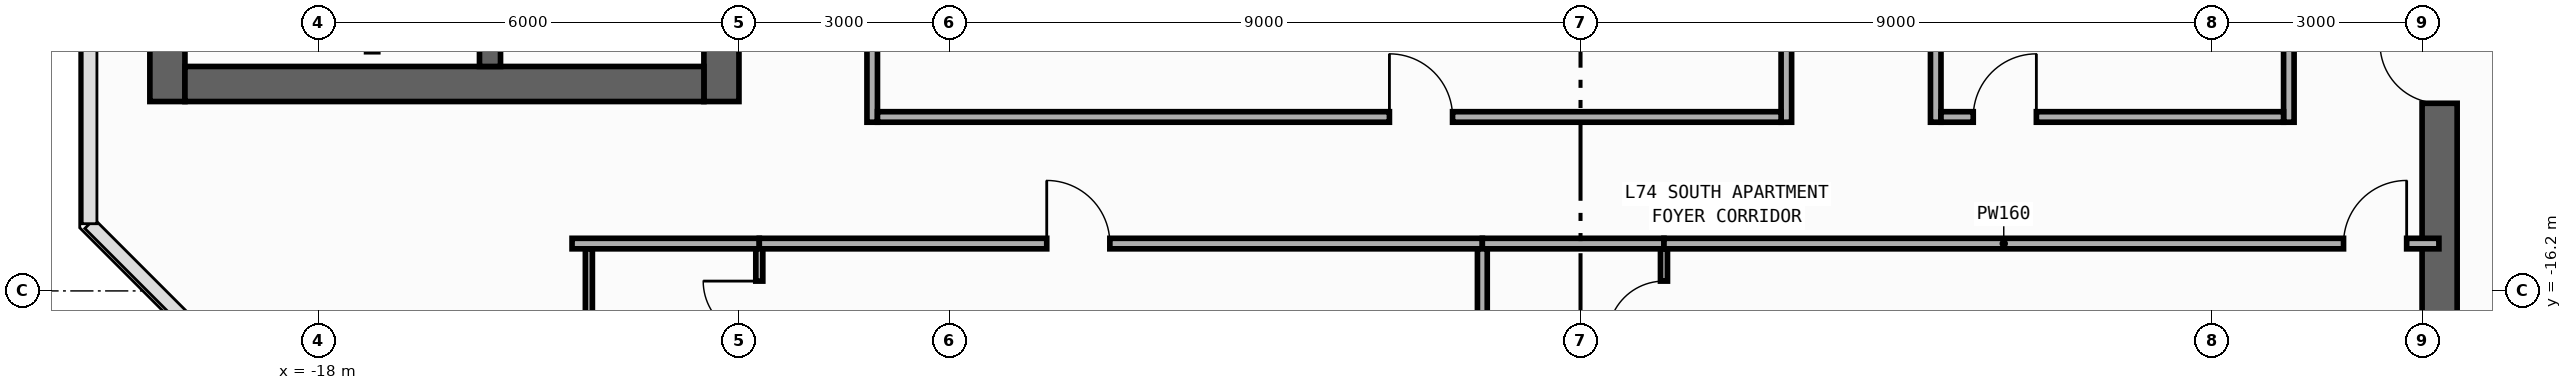
"""IFC4 building model, lengths in metres.
Left out: names, types, materials, properties, quantities, classifications, styles, units other than length and angle.
Written with IfcOpenShell. Run it as: python <this file> out.ifc"""

import sys

from ifc_helpers import new_model, si_unit, direction, frame, frame_2d, origin, place, context, subcontext, project, spatial, rectangle, extrude, element, fill, save


model = new_model("IFC4")
c1 = context("Model", 3, precision=1e-05, world=origin(), true_north=direction((0.0, 1.0)))
c2 = subcontext(c1, "Body", "Model", "MODEL_VIEW")
j1 = project(units=[si_unit("LENGTHUNIT", "METRE"), si_unit("PLANEANGLEUNIT", "RADIAN")], contexts=[c1])
p1 = place(None, origin())
s1 = spatial("IfcSite", under=j1, at=p1, CompositionType="ELEMENT")
p2 = place(p1, origin())
s2 = spatial("IfcBuilding", under=s1, at=p2, CompositionType="ELEMENT")
p3 = place(p2, frame((0.0, 0.0, 308.0)))
s3 = spatial("IfcBuildingStorey", under=s2, at=p3, CompositionType="ELEMENT", Elevation=308.0)
p4 = place(p3, frame((-20.15, -13.5, 0.0), z_axis=(0.0, 0.0, 1.0), x_axis=(0.0, 1.0, 0.0)))
e1 = element("IfcWall", 1, at=p4, inside=s3, PredefinedType="SHEAR", context=c2, shape_type="SweptSolid", body=[
    extrude(rectangle(XDim=27.0, YDim=0.5, at=frame_2d((13.5, 0.0))), origin(), (0.0, 0.0, 1.0), 3.54),
])
p5 = place(p3, frame((-12.25, -13.5, 0.0), z_axis=(0.0, 0.0, 1.0), x_axis=(0.0, 1.0, 0.0)))
e2 = element("IfcWall", 2, at=p5, inside=s3, PredefinedType="SHEAR", context=c2, shape_type="SweptSolid", body=[
    extrude(rectangle(XDim=27.0, YDim=0.5, at=frame_2d((13.5, 0.0))), origin(), (0.0, 0.0, 1.0), 3.54),
])
p6 = place(p5, frame((15.175, 0.0, 0.0)))
e3 = element("IfcOpeningElement", 3, at=p6, cuts=e2, PredefinedType="OPENING", context=c2, shape_type="SweptSolid", body=[
    extrude(rectangle(XDim=0.85, YDim=2.1, at=frame_2d((0.425, 1.05))), frame((0.0, 0.26, 0.0), z_axis=(0.0, -1.0, 0.0), x_axis=(1.0, 0.0, 0.0)), (0.0, 0.0, 1.0), 0.52),
])
p7 = place(p5, frame((21.275, 0.0, 0.0)))
e4 = element("IfcOpeningElement", 4, at=p7, cuts=e2, PredefinedType="OPENING", context=c2, shape_type="SweptSolid", body=[
    extrude(rectangle(XDim=0.85, YDim=2.1, at=frame_2d((0.425, 1.05))), frame((0.0, 0.26, 0.0), z_axis=(0.0, -1.0, 0.0), x_axis=(1.0, 0.0, 0.0)), (0.0, 0.0, 1.0), 0.52),
])
p8 = place(p5, frame((4.275, 0.0, 0.0)))
e5 = element("IfcOpeningElement", 5, at=p8, cuts=e2, PredefinedType="OPENING", context=c2, shape_type="SweptSolid", body=[
    extrude(rectangle(XDim=0.85, YDim=2.1, at=frame_2d((0.425, 1.05))), frame((0.0, 0.26, 0.0), z_axis=(0.0, -1.0, 0.0), x_axis=(1.0, 0.0, 0.0)), (0.0, 0.0, 1.0), 0.52),
])
p9 = place(p5, frame((10.275, 0.0, 0.0)))
e6 = element("IfcOpeningElement", 6, at=p9, cuts=e2, PredefinedType="OPENING", context=c2, shape_type="SweptSolid", body=[
    extrude(rectangle(XDim=0.85, YDim=2.1, at=frame_2d((0.425, 1.05))), frame((0.0, 0.26, 0.0), z_axis=(0.0, -1.0, 0.0), x_axis=(1.0, 0.0, 0.0)), (0.0, 0.0, 1.0), 0.52),
])
p10 = place(p5, frame((12.725, 0.0, 0.0)))
e7 = element("IfcOpeningElement", 7, at=p10, cuts=e2, PredefinedType="OPENING", context=c2, shape_type="SweptSolid", body=[
    extrude(rectangle(XDim=1.15, YDim=2.2, at=frame_2d((0.575, 1.1))), frame((0.0, 0.26, 0.0), z_axis=(0.0, -1.0, 0.0), x_axis=(1.0, 0.0, 0.0)), (0.0, 0.0, 1.0), 0.52),
])
p11 = place(p5, frame((1.625, 0.0, 0.0)))
e8 = element("IfcOpeningElement", 8, at=p11, cuts=e2, PredefinedType="OPENING", context=c2, shape_type="SweptSolid", body=[
    extrude(rectangle(XDim=0.85, YDim=2.1, at=frame_2d((0.425, 1.05))), frame((0.0, 0.26, 0.0), z_axis=(0.0, -1.0, 0.0), x_axis=(1.0, 0.0, 0.0)), (0.0, 0.0, 1.0), 0.52),
])
p12 = place(p3, frame((-19.9, -13.25, 0.0), z_axis=(0.0, 0.0, 1.0), x_axis=(1.0, 0.0, 0.0)))
e9 = element("IfcWall", 9, at=p12, inside=s3, PredefinedType="SHEAR", context=c2, shape_type="SweptSolid", body=[
    extrude(rectangle(XDim=7.4, YDim=0.5, at=frame_2d((3.7, 0.0))), origin(), (0.0, 0.0, 1.0), 3.54),
])
p13 = place(p3, frame((-15.55, -13.0, 0.0), z_axis=(0.0, 0.0, 1.0), x_axis=(0.0, 1.0, 0.0)))
e10 = element("IfcWall", 10, at=p13, inside=s3, PredefinedType="SHEAR", context=c2, shape_type="SweptSolid", body=[
    extrude(rectangle(XDim=26.0, YDim=0.3, at=frame_2d((13.0, 0.0))), origin(), (0.0, 0.0, 1.0), 3.54),
])
p14 = place(p13, frame((12.225, 0.0, 0.0)))
e11 = element("IfcOpeningElement", 11, at=p14, cuts=e10, PredefinedType="OPENING", context=c2, shape_type="SweptSolid", body=[
    extrude(rectangle(XDim=1.15, YDim=2.2, at=frame_2d((0.575, 1.1))), frame((0.0, 0.16, 0.0), z_axis=(0.0, -1.0, 0.0), x_axis=(1.0, 0.0, 0.0)), (0.0, 0.0, 1.0), 0.32),
])
p15 = place(p13, frame((1.125, 0.0, 0.0)))
e12 = element("IfcOpeningElement", 12, at=p15, cuts=e10, PredefinedType="OPENING", context=c2, shape_type="SweptSolid", body=[
    extrude(rectangle(XDim=0.85, YDim=2.1, at=frame_2d((0.425, 1.05))), frame((0.0, 0.16, 0.0), z_axis=(0.0, -1.0, 0.0), x_axis=(1.0, 0.0, 0.0)), (0.0, 0.0, 1.0), 0.32),
])
p16 = place(p3, frame((12.25, -19.8, 0.0), z_axis=(0.0, 0.0, 1.0), x_axis=(0.0, 1.0, 0.0)))
e13 = element("IfcWall", 13, at=p16, inside=s3, PredefinedType="SHEAR", context=c2, shape_type="SweptSolid", body=[
    extrude(rectangle(XDim=27.0, YDim=0.5, at=frame_2d((13.5, 0.0))), origin(), (0.0, 0.0, 1.0), 3.54),
])
p17 = place(p16, frame((23.05, 0.0, 0.0)))
e14 = element("IfcOpeningElement", 14, at=p17, cuts=e13, PredefinedType="OPENING", context=c2, shape_type="SweptSolid", body=[
    extrude(rectangle(XDim=1.1, YDim=2.2, at=frame_2d((0.55, 1.1))), frame((0.0, 0.26, 0.0), z_axis=(0.0, -1.0, 0.0), x_axis=(1.0, 0.0, 0.0)), (0.0, 0.0, 1.0), 0.52),
])
p18 = place(p16, frame((19.85, 0.0, 0.0)))
e15 = element("IfcOpeningElement", 15, at=p18, cuts=e13, PredefinedType="OPENING", context=c2, shape_type="SweptSolid", body=[
    extrude(rectangle(XDim=1.1, YDim=2.2, at=frame_2d((0.55, 1.1))), frame((0.0, 0.26, 0.0), z_axis=(0.0, -1.0, 0.0), x_axis=(1.0, 0.0, 0.0)), (0.0, 0.0, 1.0), 0.52),
])
p19 = place(p16, frame((16.65, 0.0, 0.0)))
e16 = element("IfcOpeningElement", 16, at=p19, cuts=e13, PredefinedType="OPENING", context=c2, shape_type="SweptSolid", body=[
    extrude(rectangle(XDim=1.1, YDim=2.2, at=frame_2d((0.55, 1.1))), frame((0.0, 0.26, 0.0), z_axis=(0.0, -1.0, 0.0), x_axis=(1.0, 0.0, 0.0)), (0.0, 0.0, 1.0), 0.52),
])
p20 = place(p16, frame((6.275, 0.0, 0.0)))
e17 = element("IfcOpeningElement", 17, at=p20, cuts=e13, PredefinedType="OPENING", context=c2, shape_type="SweptSolid", body=[
    extrude(rectangle(XDim=0.85, YDim=2.1, at=frame_2d((0.425, 1.05))), frame((0.0, 0.26, 0.0), z_axis=(0.0, -1.0, 0.0), x_axis=(1.0, 0.0, 0.0)), (0.0, 0.0, 1.0), 0.52),
])
p21 = place(p16, frame((8.575, 0.0, 0.0)))
e18 = element("IfcOpeningElement", 18, at=p21, cuts=e13, PredefinedType="OPENING", context=c2, shape_type="SweptSolid", body=[
    extrude(rectangle(XDim=0.85, YDim=2.1, at=frame_2d((0.425, 1.05))), frame((0.0, 0.26, 0.0), z_axis=(0.0, -1.0, 0.0), x_axis=(1.0, 0.0, 0.0)), (0.0, 0.0, 1.0), 0.52),
])
p22 = place(p16, frame((10.675, 0.0, 0.0)))
e19 = element("IfcOpeningElement", 19, at=p22, cuts=e13, PredefinedType="OPENING", context=c2, shape_type="SweptSolid", body=[
    extrude(rectangle(XDim=0.85, YDim=2.1, at=frame_2d((0.425, 1.05))), frame((0.0, 0.26, 0.0), z_axis=(0.0, -1.0, 0.0), x_axis=(1.0, 0.0, 0.0)), (0.0, 0.0, 1.0), 0.52),
])
p23 = place(p16, frame((12.725, 0.0, 0.0)))
e20 = element("IfcOpeningElement", 20, at=p23, cuts=e13, PredefinedType="OPENING", context=c2, shape_type="SweptSolid", body=[
    extrude(rectangle(XDim=1.15, YDim=2.2, at=frame_2d((0.575, 1.1))), frame((0.0, 0.26, 0.0), z_axis=(0.0, -1.0, 0.0), x_axis=(1.0, 0.0, 0.0)), (0.0, 0.0, 1.0), 0.52),
])
p24 = place(p16, frame((25.125, 0.0, 0.0)))
e21 = element("IfcOpeningElement", 21, at=p24, cuts=e13, PredefinedType="OPENING", context=c2, shape_type="SweptSolid", body=[
    extrude(rectangle(XDim=0.85, YDim=2.1, at=frame_2d((0.425, 1.05))), frame((0.0, 0.26, 0.0), z_axis=(0.0, -1.0, 0.0), x_axis=(1.0, 0.0, 0.0)), (0.0, 0.0, 1.0), 0.52),
])
p25 = place(p3, frame((-10.1, -13.795, 0.0), z_axis=(0.0, 0.0, 1.0), x_axis=(0.0, 1.0, 0.0)))
e22 = element("IfcWall", 22, at=p25, inside=s3, PredefinedType="PARTITIONING", context=c2, shape_type="SweptSolid", body=[
    extrude(rectangle(XDim=16.605, YDim=0.15, at=frame_2d((8.302, 0.0))), origin(), (0.0, 0.0, 1.0), 3.54),
])
p26 = place(p25, frame((7.954, 0.0, 0.0)))
e23 = element("IfcOpeningElement", 23, at=p26, cuts=e22, PredefinedType="OPENING", context=c2, shape_type="SweptSolid", body=[
    extrude(rectangle(XDim=0.9, YDim=2.15, at=frame_2d((0.45, 1.075))), frame((0.0, 0.085, 0.0), z_axis=(0.0, -1.0, 0.0), x_axis=(1.0, 0.0, 0.0)), (0.0, 0.0, 1.0), 0.17),
])
p27 = place(p3, frame((10.1, -13.795, 0.0), z_axis=(0.0, 0.0, 1.0), x_axis=(0.0, 1.0, 0.0)))
e24 = element("IfcWall", 24, at=p27, inside=s3, PredefinedType="PARTITIONING", context=c2, shape_type="SweptSolid", body=[
    extrude(rectangle(XDim=13.975, YDim=0.15, at=frame_2d((6.987, 0.0))), origin(), (0.0, 0.0, 1.0), 3.54),
])
p28 = place(p27, frame((7.956, 0.0, 0.0)))
e25 = element("IfcOpeningElement", 25, at=p28, cuts=e24, PredefinedType="OPENING", context=c2, shape_type="SweptSolid", body=[
    extrude(rectangle(XDim=0.9, YDim=2.15, at=frame_2d((0.45, 1.075))), frame((0.0, 0.085, 0.0), z_axis=(0.0, -1.0, 0.0), x_axis=(1.0, 0.0, 0.0)), (0.0, 0.0, 1.0), 0.17),
])
p29 = place(p3, frame((2.935, -13.795, 0.0), z_axis=(0.0, 0.0, 1.0), x_axis=(0.0, 1.0, 0.0)))
e26 = element("IfcWall", 26, at=p29, inside=s3, PredefinedType="PARTITIONING", context=c2, shape_type="SweptSolid", body=[
    extrude(rectangle(XDim=16.455, YDim=0.15, at=frame_2d((8.228, 0.0))), origin(), (0.0, 0.0, 1.0), 3.54),
])
p30 = place(p29, frame((7.878, 0.0, 0.0)))
e27 = element("IfcOpeningElement", 27, at=p30, cuts=e26, PredefinedType="OPENING", context=c2, shape_type="SweptSolid", body=[
    extrude(rectangle(XDim=0.9, YDim=2.15, at=frame_2d((0.45, 1.075))), frame((0.0, 0.085, 0.0), z_axis=(0.0, -1.0, 0.0), x_axis=(1.0, 0.0, 0.0)), (0.0, 0.0, 1.0), 0.17),
])
p31 = place(p3, frame((5.065, -13.795, 0.0), z_axis=(0.0, 0.0, 1.0), x_axis=(0.0, 1.0, 0.0)))
e28 = element("IfcWall", 28, at=p31, inside=s3, PredefinedType="PARTITIONING", context=c2, shape_type="SweptSolid", body=[
    extrude(rectangle(XDim=13.815, YDim=0.15, at=frame_2d((6.907, 0.0))), origin(), (0.0, 0.0, 1.0), 3.19),
])
p32 = place(p31, frame((7.982, 0.0, 0.0)))
e29 = element("IfcOpeningElement", 29, at=p32, cuts=e28, PredefinedType="OPENING", context=c2, shape_type="SweptSolid", body=[
    extrude(rectangle(XDim=0.9, YDim=2.15, at=frame_2d((0.45, 1.075))), frame((0.0, 0.085, 0.0), z_axis=(0.0, -1.0, 0.0), x_axis=(1.0, 0.0, 0.0)), (0.0, 0.0, 1.0), 0.17),
])
p33 = place(p3, frame((-14.38, -15.525, 0.0), z_axis=(0.0, 0.0, 1.0), x_axis=(1.0, 0.0, 0.0)))
e30 = element("IfcWall", 30, at=p33, inside=s3, PredefinedType="PARTITIONING", context=c2, shape_type="SweptSolid", body=[
    extrude(rectangle(XDim=2.67, YDim=0.15, at=frame_2d((1.335, 0.0))), origin(), (0.0, 0.0, 1.0), 3.54),
])
p34 = place(p3, frame((-11.71, -15.525, 0.0), z_axis=(0.0, 0.0, 1.0), x_axis=(1.0, 0.0, 0.0)))
e31 = element("IfcWall", 31, at=p34, inside=s3, PredefinedType="PARTITIONING", context=c2, shape_type="SweptSolid", body=[
    extrude(rectangle(XDim=10.31, YDim=0.15, at=frame_2d((5.155, 0.0))), origin(), (0.0, 0.0, 1.0), 3.54),
])
p35 = place(p34, frame((4.099, 0.0, 0.0)))
e32 = element("IfcOpeningElement", 32, at=p35, cuts=e31, PredefinedType="OPENING", context=c2, shape_type="SweptSolid", body=[
    extrude(rectangle(XDim=0.9, YDim=2.15, at=frame_2d((0.45, 1.075))), frame((0.0, 0.085, 0.0), z_axis=(0.0, -1.0, 0.0), x_axis=(1.0, 0.0, 0.0)), (0.0, 0.0, 1.0), 0.17),
])
p36 = place(p3, frame((-1.4, -15.525, 0.0), z_axis=(0.0, 0.0, 1.0), x_axis=(1.0, 0.0, 0.0)))
e33 = element("IfcWall", 33, at=p36, inside=s3, PredefinedType="PARTITIONING", context=c2, shape_type="SweptSolid", body=[
    extrude(rectangle(XDim=2.59, YDim=0.15, at=frame_2d((1.295, 0.0))), origin(), (0.0, 0.0, 1.0), 3.54),
])
p37 = place(p3, frame((1.19, -15.525, 0.0), z_axis=(0.0, 0.0, 1.0), x_axis=(1.0, 0.0, 0.0)))
e34 = element("IfcWall", 34, at=p37, inside=s3, PredefinedType="PARTITIONING", context=c2, shape_type="SweptSolid", body=[
    extrude(rectangle(XDim=11.05, YDim=0.15, at=frame_2d((5.525, 0.0))), origin(), (0.0, 0.0, 1.0), 3.54),
])
p38 = place(p37, frame((9.69, 0.0, 0.0)))
e35 = element("IfcOpeningElement", 35, at=p38, cuts=e34, PredefinedType="OPENING", context=c2, shape_type="SweptSolid", body=[
    extrude(rectangle(XDim=0.9, YDim=2.15, at=frame_2d((0.45, 1.075))), frame((0.0, 0.085, 0.0), z_axis=(0.0, -1.0, 0.0), x_axis=(1.0, 0.0, 0.0)), (0.0, 0.0, 1.0), 0.17),
])
p39 = place(p3, frame((-10.025, -13.72, 0.0), z_axis=(0.0, 0.0, 1.0), x_axis=(1.0, 0.0, 0.0)))
e36 = element("IfcWall", 36, at=p39, inside=s3, PredefinedType="PARTITIONING", context=c2, shape_type="SweptSolid", body=[
    extrude(rectangle(XDim=12.885, YDim=0.15, at=frame_2d((6.442, 0.0))), origin(), (0.0, 0.0, 1.0), 3.54),
])
p40 = place(p39, frame((7.3, 0.0, 0.0)))
e37 = element("IfcOpeningElement", 37, at=p40, cuts=e36, PredefinedType="OPENING", context=c2, shape_type="SweptSolid", body=[
    extrude(rectangle(XDim=0.9, YDim=2.15, at=frame_2d((0.45, 1.075))), frame((0.0, 0.085, 0.0), z_axis=(0.0, -1.0, 0.0), x_axis=(1.0, 0.0, 0.0)), (0.0, 0.0, 1.0), 0.17),
])
p41 = place(p3, frame((5.14, -13.72, 0.0), z_axis=(0.0, 0.0, 1.0), x_axis=(1.0, 0.0, 0.0)))
e38 = element("IfcWall", 38, at=p41, inside=s3, PredefinedType="PARTITIONING", context=c2, shape_type="SweptSolid", body=[
    extrude(rectangle(XDim=4.885, YDim=0.15, at=frame_2d((2.442, 0.0))), origin(), (0.0, 0.0, 1.0), 3.54),
])
p42 = place(p41, frame((0.46, 0.0, 0.0)))
e39 = element("IfcOpeningElement", 39, at=p42, cuts=e38, PredefinedType="OPENING", context=c2, shape_type="SweptSolid", body=[
    extrude(rectangle(XDim=0.9, YDim=2.15, at=frame_2d((0.45, 1.075))), frame((0.0, 0.085, 0.0), z_axis=(0.0, -1.0, 0.0), x_axis=(1.0, 0.0, 0.0)), (0.0, 0.0, 1.0), 0.17),
])
p43 = place(p3, frame((-11.71, -18.1, 0.0), z_axis=(0.0, 0.0, 1.0), x_axis=(0.0, 1.0, 0.0)))
e40 = element("IfcWall", 40, at=p43, inside=s3, PredefinedType="PARTITIONING", context=c2, shape_type="SweptSolid", body=[
    extrude(rectangle(XDim=2.5, YDim=0.1, at=frame_2d((1.25, 0.0))), origin(), (0.0, 0.0, 1.0), 3.54),
])
p44 = place(p43, frame((1.24, 0.0, 0.0)))
e41 = element("IfcOpeningElement", 41, at=p44, cuts=e40, PredefinedType="OPENING", context=c2, shape_type="SweptSolid", body=[
    extrude(rectangle(XDim=0.8, YDim=2.1, at=frame_2d((0.4, 1.05))), frame((0.0, 0.06, 0.0), z_axis=(0.0, -1.0, 0.0), x_axis=(1.0, 0.0, 0.0)), (0.0, 0.0, 1.0), 0.12),
])
p45 = place(p3, frame((-1.4, -18.1, 0.0), z_axis=(0.0, 0.0, 1.0), x_axis=(0.0, 1.0, 0.0)))
e42 = element("IfcWall", 42, at=p45, inside=s3, PredefinedType="PARTITIONING", context=c2, shape_type="SweptSolid", body=[
    extrude(rectangle(XDim=2.5, YDim=0.14, at=frame_2d((1.25, 0.0))), origin(), (0.0, 0.0, 1.0), 3.54),
])
p46 = place(p3, frame((1.19, -18.1, 0.0), z_axis=(0.0, 0.0, 1.0), x_axis=(0.0, 1.0, 0.0)))
e43 = element("IfcWall", 43, at=p46, inside=s3, PredefinedType="PARTITIONING", context=c2, shape_type="SweptSolid", body=[
    extrude(rectangle(XDim=2.5, YDim=0.1, at=frame_2d((1.25, 0.0))), origin(), (0.0, 0.0, 1.0), 3.54),
])
p47 = place(p46, frame((1.24, 0.0, 0.0)))
e44 = element("IfcOpeningElement", 44, at=p47, cuts=e43, PredefinedType="OPENING", context=c2, shape_type="SweptSolid", body=[
    extrude(rectangle(XDim=0.8, YDim=2.1, at=frame_2d((0.4, 1.05))), frame((0.0, 0.06, 0.0), z_axis=(0.0, -1.0, 0.0), x_axis=(1.0, 0.0, 0.0)), (0.0, 0.0, 1.0), 0.12),
])
p48 = place(p3, frame((-14.14, -18.05, 0.0), z_axis=(0.0, 0.0, 1.0), x_axis=(0.0, 1.0, 0.0)))
e45 = element("IfcWall", 45, at=p48, inside=s3, PredefinedType="PARTITIONING", context=c2, shape_type="SweptSolid", body=[
    extrude(rectangle(XDim=2.45, YDim=0.1, at=frame_2d((1.225, 0.0))), origin(), (0.0, 0.0, 1.0), 2.64),
])
p49 = place(p20, origin())
e46 = element("IfcDoor", 46, at=p49, inside=s3, OperationType="SINGLE_SWING_RIGHT", PredefinedType="DOOR", context=c2, shape_type="SweptSolid", body=[
    extrude(rectangle(XDim=0.85, YDim=2.1, at=frame_2d((0.425, 1.05))), frame((0.0, 0.025, 0.0), z_axis=(0.0, -1.0, 0.0), x_axis=(1.0, 0.0, 0.0)), (0.0, 0.0, 1.0), 0.05),
])
fill(e17, e46)
p50 = place(p35, origin())
e47 = element("IfcDoor", 47, at=p50, inside=s3, OperationType="SINGLE_SWING_LEFT", PredefinedType="DOOR", context=c2, shape_type="SweptSolid", body=[
    extrude(rectangle(XDim=0.9, YDim=2.15, at=frame_2d((0.45, 1.075))), frame((0.0, 0.025, 0.0), z_axis=(0.0, -1.0, 0.0), x_axis=(1.0, 0.0, 0.0)), (0.0, 0.0, 1.0), 0.05),
])
fill(e32, e47)
p51 = place(p38, origin())
e48 = element("IfcDoor", 48, at=p51, inside=s3, OperationType="SINGLE_SWING_RIGHT", PredefinedType="DOOR", context=c2, shape_type="SweptSolid", body=[
    extrude(rectangle(XDim=0.9, YDim=2.15, at=frame_2d((0.45, 1.075))), frame((0.0, 0.025, 0.0), z_axis=(0.0, -1.0, 0.0), x_axis=(1.0, 0.0, 0.0)), (0.0, 0.0, 1.0), 0.05),
])
fill(e35, e48)
p52 = place(p40, origin())
e49 = element("IfcDoor", 49, at=p52, inside=s3, OperationType="SINGLE_SWING_LEFT", PredefinedType="DOOR", context=c2, shape_type="SweptSolid", body=[
    extrude(rectangle(XDim=0.9, YDim=2.15, at=frame_2d((0.45, 1.075))), frame((0.0, 0.025, 0.0), z_axis=(0.0, -1.0, 0.0), x_axis=(1.0, 0.0, 0.0)), (0.0, 0.0, 1.0), 0.05),
])
fill(e37, e49)
p53 = place(p42, origin())
e50 = element("IfcDoor", 50, at=p53, inside=s3, OperationType="SINGLE_SWING_RIGHT", PredefinedType="DOOR", context=c2, shape_type="SweptSolid", body=[
    extrude(rectangle(XDim=0.9, YDim=2.15, at=frame_2d((0.45, 1.075))), frame((0.0, 0.025, 0.0), z_axis=(0.0, -1.0, 0.0), x_axis=(1.0, 0.0, 0.0)), (0.0, 0.0, 1.0), 0.05),
])
fill(e39, e50)
p54 = place(p44, origin())
e51 = element("IfcDoor", 51, at=p54, inside=s3, OperationType="SINGLE_SWING_RIGHT", PredefinedType="DOOR", context=c2, shape_type="SweptSolid", body=[
    extrude(rectangle(XDim=0.8, YDim=2.1, at=frame_2d((0.4, 1.05))), frame((0.0, 0.025, 0.0), z_axis=(0.0, -1.0, 0.0), x_axis=(1.0, 0.0, 0.0)), (0.0, 0.0, 1.0), 0.05),
])
fill(e41, e51)
p55 = place(p47, origin())
e52 = element("IfcDoor", 52, at=p55, inside=s3, OperationType="SINGLE_SWING_LEFT", PredefinedType="DOOR", context=c2, shape_type="SweptSolid", body=[
    extrude(rectangle(XDim=0.8, YDim=2.1, at=frame_2d((0.4, 1.05))), frame((0.0, 0.025, 0.0), z_axis=(0.0, -1.0, 0.0), x_axis=(1.0, 0.0, 0.0)), (0.0, 0.0, 1.0), 0.05),
])
fill(e44, e52)
save(model, sys.argv[1])
